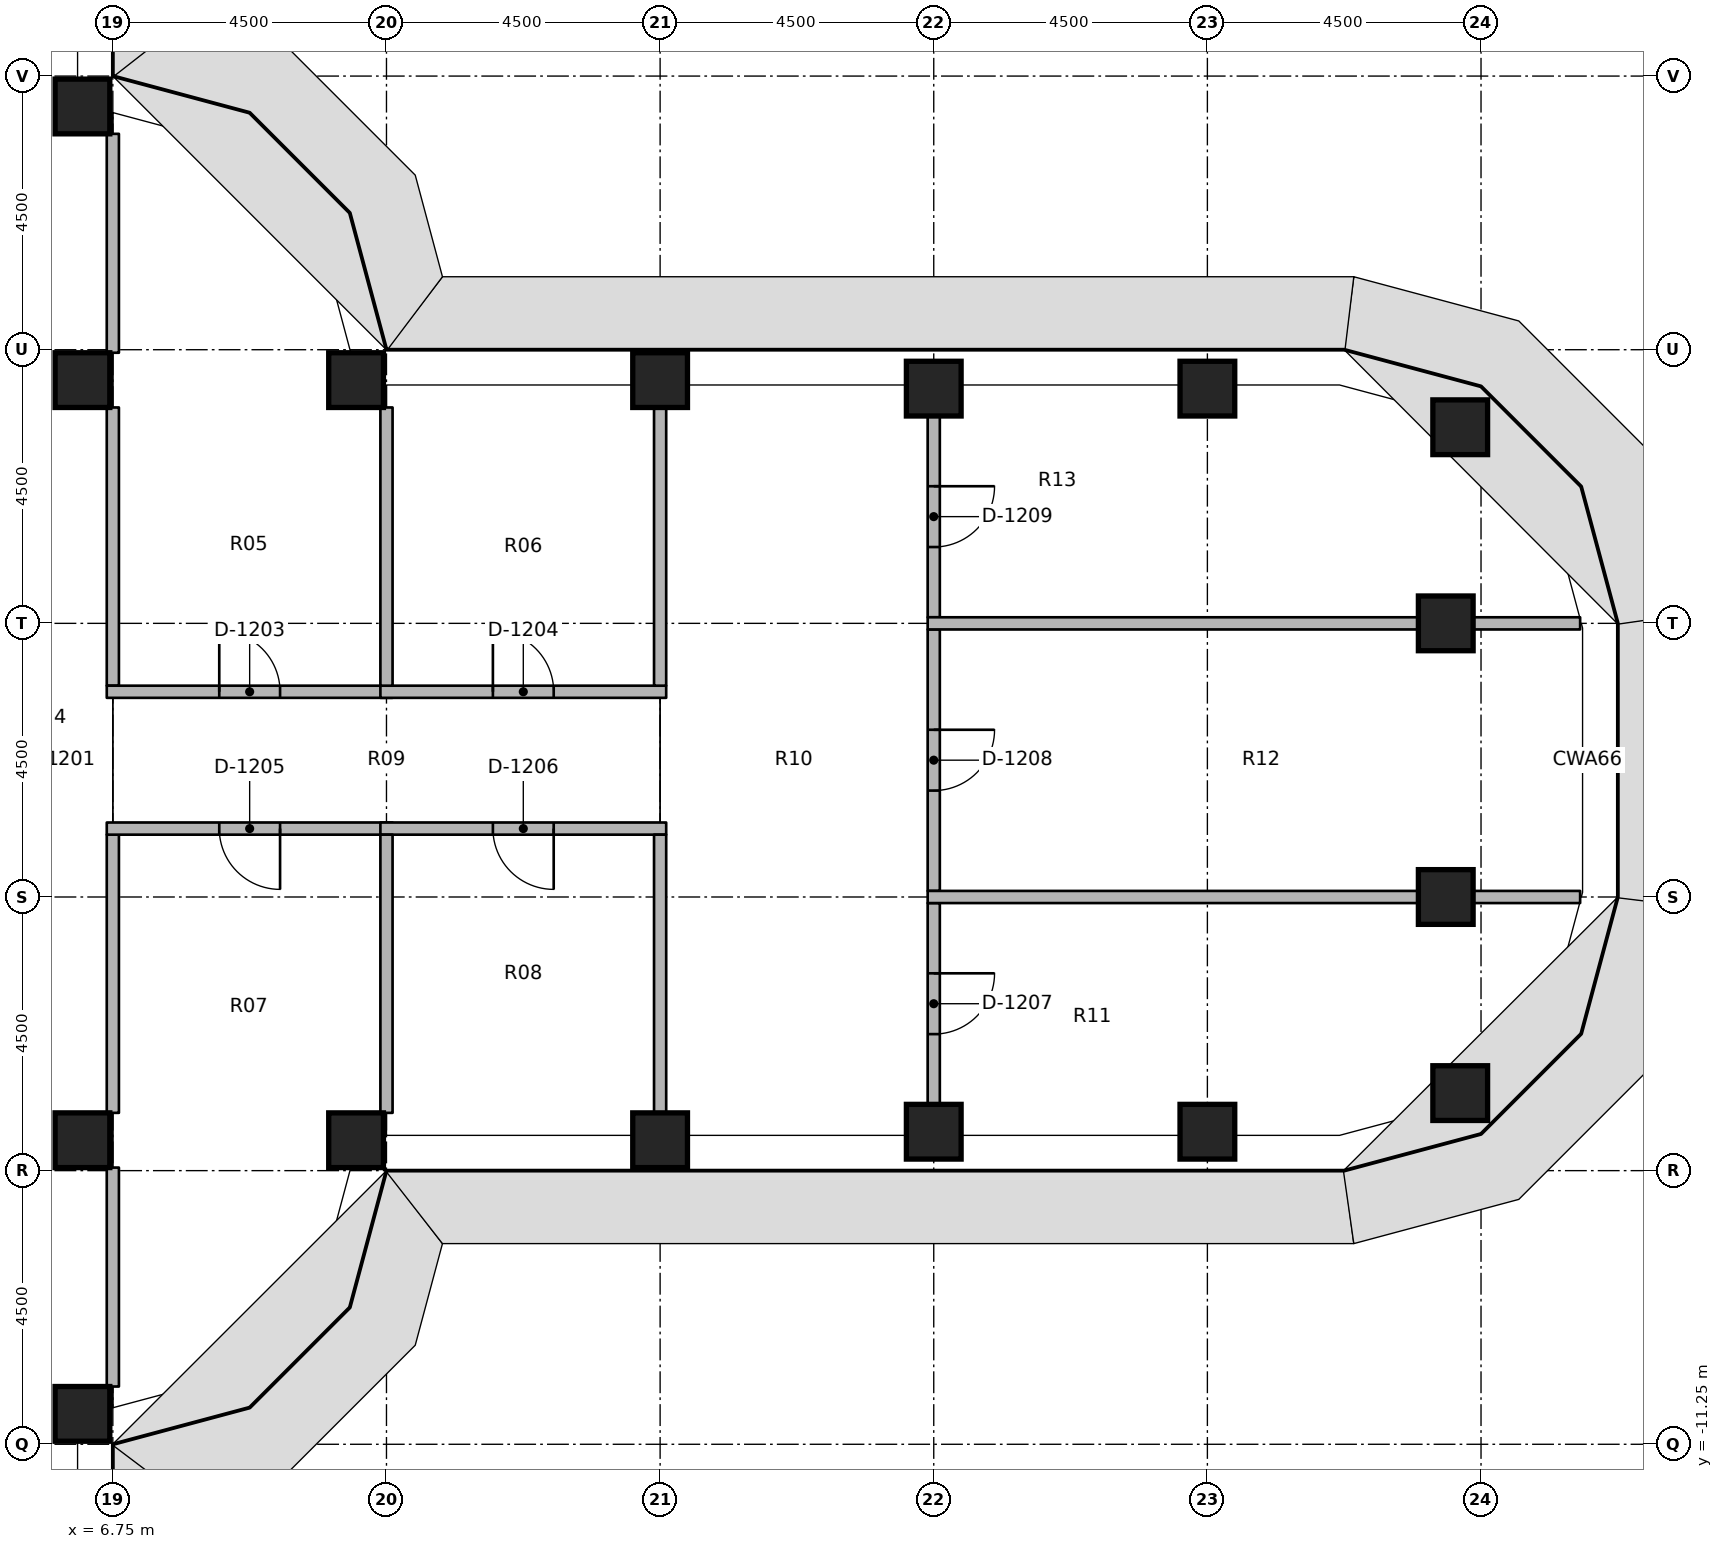
"""IFC4 building model, lengths in metres.
Left out: names, types, materials, properties, quantities, classifications, styles, units other than length and angle.
Written with IfcOpenShell. Run it as: python <this file> out.ifc"""

import sys

from ifc_helpers import new_model, si_unit, direction, frame, frame_2d, origin, origin_2d, place, context, subcontext, project, spatial, rectangle, extrude, element, fill, save


model = new_model("IFC4")
c1 = context("Model", 3, precision=1e-05, world=origin(), true_north=direction((0.0, 1.0)))
c2 = subcontext(c1, "Body", "Model", "MODEL_VIEW")
j1 = project(units=[si_unit("LENGTHUNIT", "METRE"), si_unit("PLANEANGLEUNIT", "RADIAN")], contexts=[c1])
p1 = place(None, origin())
s1 = spatial("IfcSite", under=j1, at=p1, CompositionType="ELEMENT")
p2 = place(p1, origin())
s2 = spatial("IfcBuilding", under=s1, at=p2, CompositionType="ELEMENT")
p3 = place(p2, frame((0.0, 0.0, 128.4)))
s3 = spatial("IfcBuildingStorey", under=s2, at=p3, CompositionType="ELEMENT", Elevation=128.4)
for number, where, z_axis, x_axis in (
    (1, (6.25, -10.75, 0.0), (0.0, 0.0, 1.0), (1.0, 0.0, 0.0)),
    (2, (6.25, -6.25, 0.0), (0.0, 0.0, 1.0), (1.0, 0.0, 0.0)),
    (3, (6.25, 6.25, 0.0), (0.0, 0.0, 1.0), (1.0, 0.0, 0.0)),
    (4, (6.25, 10.75, 0.0), (0.0, 0.0, 1.0), (1.0, 0.0, 0.0)),
    (5, (10.75, -6.25, 0.0), (0.0, 0.0, 1.0), (1.0, 0.0, 0.0)),
    (6, (10.75, 6.25, 0.0), (0.0, 0.0, 1.0), (1.0, 0.0, 0.0)),
    (7, (15.75, -6.25, 0.0), (0.0, 0.0, 1.0), (1.0, 0.0, 0.0)),
    (8, (15.75, 6.25, 0.0), (0.0, 0.0, 1.0), (1.0, 0.0, 0.0)),
    (9, (20.25, -6.11, 0.0), (0.0, 0.0, 1.0), (1.0, 0.0, 0.0)),
    (10, (20.25, 6.11, 0.0), (0.0, 0.0, 1.0), (1.0, 0.0, 0.0)),
    (11, (24.75, -6.11, 0.0), (0.0, 0.0, 1.0), (1.0, 0.0, 0.0)),
    (12, (24.75, 6.11, 0.0), (0.0, 0.0, 1.0), (1.0, 0.0, 0.0)),
    (13, (28.908, -5.475, 0.0), (0.0, 0.0, 1.0), (1.0, 0.0, 0.0)),
    (14, (28.67, -2.25, 0.0), (0.0, 0.0, 1.0), (1.0, 0.0, 0.0)),
    (15, (28.67, 2.25, 0.0), (0.0, 0.0, 1.0), (1.0, 0.0, 0.0)),
    (16, (28.908, 5.475, 0.0), (0.0, 0.0, 1.0), (1.0, 0.0, 0.0)),
):
    element("IfcColumn", number, at=place(p3, frame(where, z_axis=z_axis, x_axis=x_axis)), inside=s3, PredefinedType="COLUMN", context=c2, shape_type="SweptSolid", body=[
        extrude(rectangle(XDim=0.9, YDim=0.9, at=origin_2d()), origin(), (0.0, 0.0, 1.0), 3.65),
    ])
p4 = place(p3, frame((6.75, 1.225, 0.0), z_axis=(0.0, 0.0, 1.0), x_axis=(0.0, 1.0, 0.0)))
e17 = element("IfcWall", 17, at=p4, inside=s3, PredefinedType="PARTITIONING", context=c2, shape_type="SweptSolid", body=[
    extrude(rectangle(XDim=4.575, YDim=0.2, at=frame_2d((2.288, 0.0))), origin(), (0.0, 0.0, 1.0), 2.738),
])
for number, where, z_axis, x_axis in (
    (18, (6.75, 6.7, 0.0), (0.0, 0.0, 1.0), (0.0, 1.0, 0.0)),
    (19, (6.75, -10.3, 0.0), (0.0, 0.0, 1.0), (0.0, 1.0, 0.0)),
):
    element("IfcWall", number, at=place(p3, frame(where, z_axis=z_axis, x_axis=x_axis)), inside=s3, PredefinedType="PARTITIONING", context=c2, shape_type="SweptSolid", body=[
        extrude(rectangle(XDim=3.6, YDim=0.2, at=frame_2d((1.8, 0.0))), origin(), (0.0, 0.0, 1.0), 2.738),
    ])
p5 = place(p3, frame((6.75, -5.8, 0.0), z_axis=(0.0, 0.0, 1.0), x_axis=(0.0, 1.0, 0.0)))
e20 = element("IfcWall", 20, at=p5, inside=s3, PredefinedType="PARTITIONING", context=c2, shape_type="SweptSolid", body=[
    extrude(rectangle(XDim=4.575, YDim=0.2, at=frame_2d((2.288, 0.0))), origin(), (0.0, 0.0, 1.0), 2.738),
])
p6 = place(p3, frame((6.65, 1.125, 0.0), z_axis=(0.0, 0.0, 1.0), x_axis=(1.0, 0.0, 0.0)))
e21 = element("IfcWall", 21, at=p6, inside=s3, PredefinedType="PARTITIONING", context=c2, shape_type="SweptSolid", body=[
    extrude(rectangle(XDim=4.7, YDim=0.2, at=frame_2d((2.35, 0.0))), origin(), (0.0, 0.0, 1.0), 2.738),
])
p7 = place(p6, frame((1.85, 0.0, 0.0)))
e22 = element("IfcOpeningElement", 22, at=p7, cuts=e21, PredefinedType="OPENING", context=c2, shape_type="SweptSolid", body=[
    extrude(rectangle(XDim=1.0, YDim=2.1, at=frame_2d((0.5, 1.05))), frame((0.0, 0.11, 0.0), z_axis=(0.0, -1.0, 0.0), x_axis=(1.0, 0.0, 0.0)), (0.0, 0.0, 1.0), 0.22),
])
p8 = place(p3, frame((11.35, -1.125, 0.0), z_axis=(0.0, 0.0, 1.0), x_axis=(-1.0, 0.0, 0.0)))
e23 = element("IfcWall", 23, at=p8, inside=s3, PredefinedType="PARTITIONING", context=c2, shape_type="SweptSolid", body=[
    extrude(rectangle(XDim=4.7, YDim=0.2, at=frame_2d((2.35, 0.0))), origin(), (0.0, 0.0, 1.0), 2.738),
])
p9 = place(p8, frame((1.85, 0.0, 0.0)))
e24 = element("IfcOpeningElement", 24, at=p9, cuts=e23, PredefinedType="OPENING", context=c2, shape_type="SweptSolid", body=[
    extrude(rectangle(XDim=1.0, YDim=2.1, at=frame_2d((0.5, 1.05))), frame((0.0, 0.11, 0.0), z_axis=(0.0, -1.0, 0.0), x_axis=(1.0, 0.0, 0.0)), (0.0, 0.0, 1.0), 0.22),
])
p10 = place(p3, frame((11.15, 1.125, 0.0), z_axis=(0.0, 0.0, 1.0), x_axis=(1.0, 0.0, 0.0)))
e25 = element("IfcWall", 25, at=p10, inside=s3, PredefinedType="PARTITIONING", context=c2, shape_type="SweptSolid", body=[
    extrude(rectangle(XDim=4.7, YDim=0.2, at=frame_2d((2.35, 0.0))), origin(), (0.0, 0.0, 1.0), 2.738),
])
p11 = place(p10, frame((1.85, 0.0, 0.0)))
e26 = element("IfcOpeningElement", 26, at=p11, cuts=e25, PredefinedType="OPENING", context=c2, shape_type="SweptSolid", body=[
    extrude(rectangle(XDim=1.0, YDim=2.1, at=frame_2d((0.5, 1.05))), frame((0.0, 0.11, 0.0), z_axis=(0.0, -1.0, 0.0), x_axis=(1.0, 0.0, 0.0)), (0.0, 0.0, 1.0), 0.22),
])
p12 = place(p3, frame((15.85, -1.125, 0.0), z_axis=(0.0, 0.0, 1.0), x_axis=(-1.0, 0.0, 0.0)))
e27 = element("IfcWall", 27, at=p12, inside=s3, PredefinedType="PARTITIONING", context=c2, shape_type="SweptSolid", body=[
    extrude(rectangle(XDim=4.7, YDim=0.2, at=frame_2d((2.35, 0.0))), origin(), (0.0, 0.0, 1.0), 2.738),
])
p13 = place(p12, frame((1.85, 0.0, 0.0)))
e28 = element("IfcOpeningElement", 28, at=p13, cuts=e27, PredefinedType="OPENING", context=c2, shape_type="SweptSolid", body=[
    extrude(rectangle(XDim=1.0, YDim=2.1, at=frame_2d((0.5, 1.05))), frame((0.0, 0.11, 0.0), z_axis=(0.0, -1.0, 0.0), x_axis=(1.0, 0.0, 0.0)), (0.0, 0.0, 1.0), 0.22),
])
for number, where, z_axis, x_axis in (
    (29, (11.25, 1.225, 0.0), (0.0, 0.0, 1.0), (0.0, 1.0, 0.0)),
    (30, (11.25, -5.8, 0.0), (0.0, 0.0, 1.0), (0.0, 1.0, 0.0)),
    (31, (15.75, 1.225, 0.0), (0.0, 0.0, 1.0), (0.0, 1.0, 0.0)),
    (32, (15.75, -5.8, 0.0), (0.0, 0.0, 1.0), (0.0, 1.0, 0.0)),
):
    element("IfcWall", number, at=place(p3, frame(where, z_axis=z_axis, x_axis=x_axis)), inside=s3, PredefinedType="PARTITIONING", context=c2, shape_type="SweptSolid", body=[
        extrude(rectangle(XDim=4.575, YDim=0.2, at=frame_2d((2.288, 0.0))), origin(), (0.0, 0.0, 1.0), 2.738),
    ])
p14 = place(p3, frame((20.25, -2.35, 0.0), z_axis=(0.0, 0.0, 1.0), x_axis=(0.0, -1.0, 0.0)))
e33 = element("IfcWall", 33, at=p14, inside=s3, PredefinedType="PARTITIONING", context=c2, shape_type="SweptSolid", body=[
    extrude(rectangle(XDim=3.31, YDim=0.2, at=frame_2d((1.655, 0.0))), origin(), (0.0, 0.0, 1.0), 2.738),
])
p15 = place(p14, frame((1.155, 0.0, 0.0)))
e34 = element("IfcOpeningElement", 34, at=p15, cuts=e33, PredefinedType="OPENING", context=c2, shape_type="SweptSolid", body=[
    extrude(rectangle(XDim=1.0, YDim=2.1, at=frame_2d((0.5, 1.05))), frame((0.0, 0.11, 0.0), z_axis=(0.0, -1.0, 0.0), x_axis=(1.0, 0.0, 0.0)), (0.0, 0.0, 1.0), 0.22),
])
p16 = place(p3, frame((20.25, 2.15, 0.0), z_axis=(0.0, 0.0, 1.0), x_axis=(0.0, -1.0, 0.0)))
e35 = element("IfcWall", 35, at=p16, inside=s3, PredefinedType="PARTITIONING", context=c2, shape_type="SweptSolid", body=[
    extrude(rectangle(XDim=4.3, YDim=0.2, at=frame_2d((2.15, 0.0))), origin(), (0.0, 0.0, 1.0), 2.738),
])
p17 = place(p16, frame((1.65, 0.0, 0.0)))
e36 = element("IfcOpeningElement", 36, at=p17, cuts=e35, PredefinedType="OPENING", context=c2, shape_type="SweptSolid", body=[
    extrude(rectangle(XDim=1.0, YDim=2.1, at=frame_2d((0.5, 1.05))), frame((0.0, 0.11, 0.0), z_axis=(0.0, -1.0, 0.0), x_axis=(1.0, 0.0, 0.0)), (0.0, 0.0, 1.0), 0.22),
])
p18 = place(p3, frame((20.25, 5.66, 0.0), z_axis=(0.0, 0.0, 1.0), x_axis=(0.0, -1.0, 0.0)))
e37 = element("IfcWall", 37, at=p18, inside=s3, PredefinedType="PARTITIONING", context=c2, shape_type="SweptSolid", body=[
    extrude(rectangle(XDim=3.31, YDim=0.2, at=frame_2d((1.655, 0.0))), origin(), (0.0, 0.0, 1.0), 2.738),
])
p19 = place(p18, frame((1.155, 0.0, 0.0)))
e38 = element("IfcOpeningElement", 38, at=p19, cuts=e37, PredefinedType="OPENING", context=c2, shape_type="SweptSolid", body=[
    extrude(rectangle(XDim=1.0, YDim=2.1, at=frame_2d((0.5, 1.05))), frame((0.0, 0.11, 0.0), z_axis=(0.0, -1.0, 0.0), x_axis=(1.0, 0.0, 0.0)), (0.0, 0.0, 1.0), 0.22),
])
p20 = place(p3, frame((20.15, -2.25, 0.0), z_axis=(0.0, 0.0, 1.0), x_axis=(1.0, 0.0, 0.0)))
e39 = element("IfcWall", 39, at=p20, inside=s3, PredefinedType="PARTITIONING", context=c2, shape_type="SweptSolid", body=[
    extrude(rectangle(XDim=8.07, YDim=0.2, at=frame_2d((4.035, 0.0))), origin(), (0.0, 0.0, 1.0), 2.738),
])
p21 = place(p3, frame((29.12, -2.25, 0.0), z_axis=(0.0, 0.0, 1.0), x_axis=(1.0, 0.0, 0.0)))
e40 = element("IfcWall", 40, at=p21, inside=s3, PredefinedType="PARTITIONING", context=c2, shape_type="SweptSolid", body=[
    extrude(rectangle(XDim=1.76, YDim=0.2, at=frame_2d((0.88, 0.0))), origin(), (0.0, 0.0, 1.0), 2.738),
])
p22 = place(p3, frame((20.15, 2.25, 0.0), z_axis=(0.0, 0.0, 1.0), x_axis=(1.0, 0.0, 0.0)))
e41 = element("IfcWall", 41, at=p22, inside=s3, PredefinedType="PARTITIONING", context=c2, shape_type="SweptSolid", body=[
    extrude(rectangle(XDim=8.07, YDim=0.2, at=frame_2d((4.035, 0.0))), origin(), (0.0, 0.0, 1.0), 2.738),
])
p23 = place(p3, frame((29.12, 2.25, 0.0), z_axis=(0.0, 0.0, 1.0), x_axis=(1.0, 0.0, 0.0)))
e42 = element("IfcWall", 42, at=p23, inside=s3, PredefinedType="PARTITIONING", context=c2, shape_type="SweptSolid", body=[
    extrude(rectangle(XDim=1.76, YDim=0.2, at=frame_2d((0.88, 0.0))), origin(), (0.0, 0.0, 1.0), 2.738),
])
p24 = place(p7, origin())
e43 = element("IfcDoor", 43, at=p24, inside=s3, OperationType="SINGLE_SWING_RIGHT", PredefinedType="DOOR", context=c2, shape_type="SweptSolid", body=[
    extrude(rectangle(XDim=1.0, YDim=2.1, at=frame_2d((0.5, 1.05))), frame((0.0, 0.025, 0.0), z_axis=(0.0, -1.0, 0.0), x_axis=(1.0, 0.0, 0.0)), (0.0, 0.0, 1.0), 0.05),
])
fill(e22, e43)
p25 = place(p11, origin())
e44 = element("IfcDoor", 44, at=p25, inside=s3, OperationType="SINGLE_SWING_RIGHT", PredefinedType="DOOR", context=c2, shape_type="SweptSolid", body=[
    extrude(rectangle(XDim=1.0, YDim=2.1, at=frame_2d((0.5, 1.05))), frame((0.0, 0.025, 0.0), z_axis=(0.0, -1.0, 0.0), x_axis=(1.0, 0.0, 0.0)), (0.0, 0.0, 1.0), 0.05),
])
fill(e26, e44)
p26 = place(p9, origin())
e45 = element("IfcDoor", 45, at=p26, inside=s3, OperationType="SINGLE_SWING_RIGHT", PredefinedType="DOOR", context=c2, shape_type="SweptSolid", body=[
    extrude(rectangle(XDim=1.0, YDim=2.1, at=frame_2d((0.5, 1.05))), frame((0.0, 0.025, 0.0), z_axis=(0.0, -1.0, 0.0), x_axis=(1.0, 0.0, 0.0)), (0.0, 0.0, 1.0), 0.05),
])
fill(e24, e45)
p27 = place(p13, origin())
e46 = element("IfcDoor", 46, at=p27, inside=s3, OperationType="SINGLE_SWING_RIGHT", PredefinedType="DOOR", context=c2, shape_type="SweptSolid", body=[
    extrude(rectangle(XDim=1.0, YDim=2.1, at=frame_2d((0.5, 1.05))), frame((0.0, 0.025, 0.0), z_axis=(0.0, -1.0, 0.0), x_axis=(1.0, 0.0, 0.0)), (0.0, 0.0, 1.0), 0.05),
])
fill(e28, e46)
p28 = place(p15, origin())
e47 = element("IfcDoor", 47, at=p28, inside=s3, OperationType="SINGLE_SWING_LEFT", PredefinedType="DOOR", context=c2, shape_type="SweptSolid", body=[
    extrude(rectangle(XDim=1.0, YDim=2.1, at=frame_2d((0.5, 1.05))), frame((0.0, 0.025, 0.0), z_axis=(0.0, -1.0, 0.0), x_axis=(1.0, 0.0, 0.0)), (0.0, 0.0, 1.0), 0.05),
])
fill(e34, e47)
p29 = place(p17, origin())
e48 = element("IfcDoor", 48, at=p29, inside=s3, OperationType="SINGLE_SWING_RIGHT", PredefinedType="DOOR", context=c2, shape_type="SweptSolid", body=[
    extrude(rectangle(XDim=1.0, YDim=2.1, at=frame_2d((0.5, 1.05))), frame((0.0, 0.025, 0.0), z_axis=(0.0, -1.0, 0.0), x_axis=(1.0, 0.0, 0.0)), (0.0, 0.0, 1.0), 0.05),
])
fill(e36, e48)
p30 = place(p19, origin())
e49 = element("IfcDoor", 49, at=p30, inside=s3, OperationType="SINGLE_SWING_RIGHT", PredefinedType="DOOR", context=c2, shape_type="SweptSolid", body=[
    extrude(rectangle(XDim=1.0, YDim=2.1, at=frame_2d((0.5, 1.05))), frame((0.0, 0.025, 0.0), z_axis=(0.0, -1.0, 0.0), x_axis=(1.0, 0.0, 0.0)), (0.0, 0.0, 1.0), 0.05),
])
fill(e38, e49)
save(model, sys.argv[1])
